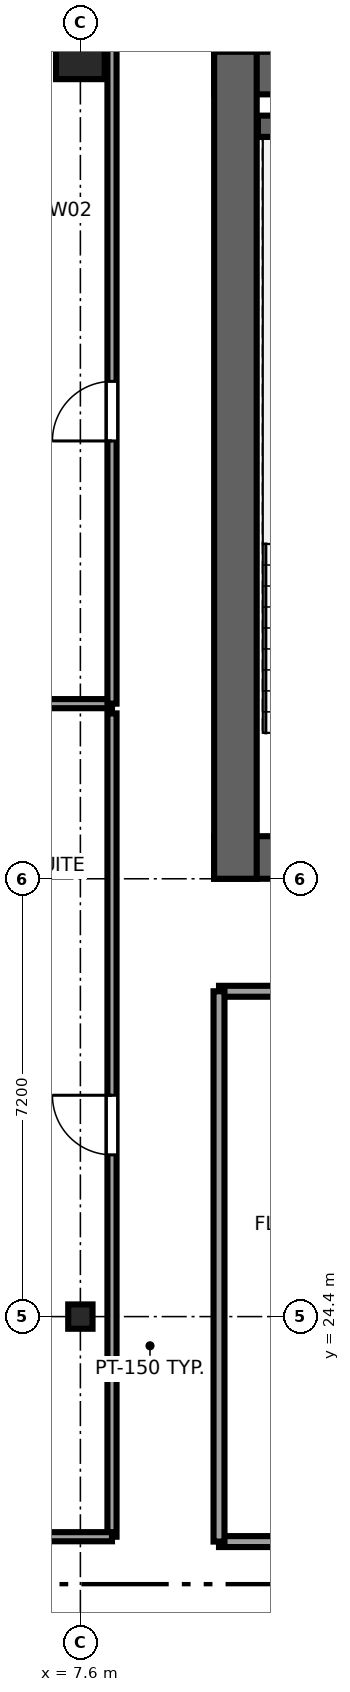
"""IFC4 building model, lengths in metres.
Left out: names, types, materials, properties, quantities, classifications, styles, units other than length and angle.
Written with IfcOpenShell. Run it as: python <this file> out.ifc"""

import sys

from ifc_helpers import new_model, si_unit, direction, frame, frame_2d, origin, origin_2d, place, context, subcontext, project, spatial, rectangle, i_section, extrude, source, transform, mapped, element, fill, save


model = new_model("IFC4")
c1 = context("Model", 3, precision=1e-05, world=origin(), true_north=direction((0.0, 1.0)))
c2 = subcontext(c1, "Body", "Model", "MODEL_VIEW")
j1 = project(units=[si_unit("LENGTHUNIT", "METRE"), si_unit("PLANEANGLEUNIT", "RADIAN")], contexts=[c1])
p1 = place(None, origin())
s1 = spatial("IfcSite", under=j1, at=p1, CompositionType="ELEMENT")
p2 = place(p1, origin())
s2 = spatial("IfcBuilding", under=s1, at=p2, CompositionType="ELEMENT")
p3 = place(p2, frame((0.0, 0.0, 175.45)))
s3 = spatial("IfcBuildingStorey", under=s2, at=p3, CompositionType="ELEMENT", Elevation=175.45)
p4 = place(p3, frame((9.8, 31.95, 0.0), z_axis=(0.0, 0.0, 1.0), x_axis=(1.0, 0.0, 0.0)))
e1 = element("IfcWall", 1, at=p4, inside=s3, PredefinedType="SHEAR", context=c2, shape_type="SweptSolid", body=[
    extrude(rectangle(XDim=26.4, YDim=0.7, at=frame_2d((13.2, 0.0))), origin(), (0.0, 0.0, 1.0), 3.55),
])
p5 = place(p4, frame((6.32, 0.0, 0.0), z_axis=(0.0, 0.0, 1.0), x_axis=(-1.0, 0.0, 0.0)))
e2 = element("IfcOpeningElement", 2, at=p5, cuts=e1, PredefinedType="OPENING", context=c2, shape_type="SweptSolid", body=[
    extrude(rectangle(XDim=1.5, YDim=2.04, at=frame_2d((0.75, 1.02))), frame((0.0, 0.36, 0.0), z_axis=(0.0, -1.0, 0.0), x_axis=(1.0, 0.0, 0.0)), (0.0, 0.0, 1.0), 0.72),
])
p6 = place(p4, frame((13.95, 0.0, 0.0), z_axis=(0.0, 0.0, 1.0), x_axis=(-1.0, 0.0, 0.0)))
e3 = element("IfcOpeningElement", 3, at=p6, cuts=e1, PredefinedType="OPENING", context=c2, shape_type="SweptSolid", body=[
    extrude(rectangle(XDim=1.5, YDim=2.04, at=frame_2d((0.75, 1.02))), frame((0.0, 0.36, 0.0), z_axis=(0.0, -1.0, 0.0), x_axis=(1.0, 0.0, 0.0)), (0.0, 0.0, 1.0), 0.72),
])
p7 = place(p4, frame((20.25, 0.0, 0.0), z_axis=(0.0, 0.0, 1.0), x_axis=(-1.0, 0.0, 0.0)))
e4 = element("IfcOpeningElement", 4, at=p7, cuts=e1, PredefinedType="OPENING", context=c2, shape_type="SweptSolid", body=[
    extrude(rectangle(XDim=1.5, YDim=2.04, at=frame_2d((0.75, 1.02))), frame((0.0, 0.36, 0.0), z_axis=(0.0, -1.0, 0.0), x_axis=(1.0, 0.0, 0.0)), (0.0, 0.0, 1.0), 0.72),
])
p8 = place(p4, frame((8.37, 0.0, 0.0), z_axis=(0.0, 0.0, 1.0), x_axis=(-1.0, 0.0, 0.0)))
e5 = element("IfcOpeningElement", 5, at=p8, cuts=e1, PredefinedType="OPENING", context=c2, shape_type="SweptSolid", body=[
    extrude(rectangle(XDim=0.82, YDim=2.01, at=frame_2d((0.41, 1.005))), frame((0.0, 0.36, 0.0), z_axis=(0.0, -1.0, 0.0), x_axis=(1.0, 0.0, 0.0)), (0.0, 0.0, 1.0), 0.72),
])
p9 = place(p3, frame((9.8, 44.85, 0.0), z_axis=(0.0, 0.0, 1.0), x_axis=(1.0, 0.0, 0.0)))
e6 = element("IfcWall", 6, at=p9, inside=s3, PredefinedType="SHEAR", context=c2, shape_type="SweptSolid", body=[
    extrude(rectangle(XDim=26.4, YDim=0.7, at=frame_2d((13.2, 0.0))), origin(), (0.0, 0.0, 1.0), 3.55),
])
p10 = place(p3, frame((10.15, 31.6, 0.0), z_axis=(0.0, 0.0, 1.0), x_axis=(0.0, 1.0, 0.0)))
e7 = element("IfcWall", 7, at=p10, inside=s3, PredefinedType="SHEAR", context=c2, shape_type="SweptSolid", body=[
    extrude(rectangle(XDim=13.6, YDim=0.7, at=frame_2d((6.8, 0.0))), origin(), (0.0, 0.0, 1.0), 3.55),
])
p11 = place(p3, frame((10.52, 43.975, 0.0), z_axis=(0.0, 0.0, 1.0), x_axis=(1.0, 0.0, 0.0)))
e8 = element("IfcWall", 8, at=p11, inside=s3, PredefinedType="SHEAR", context=c2, shape_type="SweptSolid", body=[
    extrude(rectangle(XDim=3.6, YDim=0.35, at=frame_2d((1.8, 0.0))), origin(), (0.0, 0.0, 1.0), 3.55),
])
m1 = source(origin(), c2, "Body", "SweptSolid", [
    extrude(i_section(OverallWidth=0.4, OverallDepth=0.4, WebThickness=0.02, FlangeThickness=0.035, at=origin_2d()), origin(), (0.0, 0.0, 1.0), 3.55),
])
p12 = place(p3, frame((7.6, 24.4, 0.0), z_axis=(0.0, 0.0, 1.0), x_axis=(1.0, 0.0, 0.0)))
e9 = element("IfcColumn", 9, at=p12, inside=s3, PredefinedType="COLUMN", context=c2, shape_type="MappedRepresentation", body=[
    mapped(m1, transform((0.0, 0.0, 0.0), x_axis=(1.0, 0.0, 0.0), y_axis=(0.0, 1.0, 0.0), z_axis=(0.0, 0.0, 1.0), scale=1.0)),
])
m2 = source(origin(), c2, "Body", "SweptSolid", [
    extrude(rectangle(XDim=0.8, YDim=0.8, at=origin_2d()), origin(), (0.0, 0.0, 1.0), 3.55),
])
p13 = place(p3, frame((7.6, 45.15, 0.0), z_axis=(0.0, 0.0, 1.0), x_axis=(1.0, 0.0, 0.0)))
e10 = element("IfcColumn", 10, at=p13, inside=s3, PredefinedType="COLUMN", context=c2, shape_type="MappedRepresentation", body=[
    mapped(m2, transform((0.0, 0.0, 0.0), x_axis=(1.0, 0.0, 0.0), y_axis=(0.0, 1.0, 0.0), z_axis=(0.0, 0.0, 1.0), scale=1.0)),
])
p14 = place(p3, frame((3.005, 34.48, 0.0), z_axis=(0.0, 0.0, 1.0), x_axis=(1.0, 0.0, 0.0)))
e11 = element("IfcWall", 11, at=p14, inside=s3, PredefinedType="PARTITIONING", context=c2, shape_type="SweptSolid", body=[
    extrude(rectangle(XDim=5.115, YDim=0.15, at=frame_2d((2.558, 0.0))), origin(), (0.0, 0.0, 1.0), 3.37),
])
p15 = place(p3, frame((8.12, 20.78, 0.0), z_axis=(0.0, 0.0, 1.0), x_axis=(0.0, 1.0, 0.0)))
e12 = element("IfcWall", 12, at=p15, inside=s3, PredefinedType="PARTITIONING", context=c2, shape_type="SweptSolid", body=[
    extrude(rectangle(XDim=13.54, YDim=0.15, at=frame_2d((6.77, 0.0))), origin(), (0.0, 0.0, 1.0), 3.37),
])
p16 = place(p15, frame((6.28, 0.0, 0.0)))
e13 = element("IfcOpeningElement", 13, at=p16, cuts=e12, PredefinedType="OPENING", context=c2, shape_type="SweptSolid", body=[
    extrude(rectangle(XDim=0.98, YDim=2.12, at=frame_2d((0.49, 1.06))), frame((0.0, 0.085, 0.0), z_axis=(0.0, -1.0, 0.0), x_axis=(1.0, 0.0, 0.0)), (0.0, 0.0, 1.0), 0.17),
])
p17 = place(p3, frame((5.07, 20.78, 0.0), z_axis=(0.0, 0.0, 1.0), x_axis=(1.0, 0.0, 0.0)))
e14 = element("IfcWall", 14, at=p17, inside=s3, PredefinedType="PARTITIONING", context=c2, shape_type="SweptSolid", body=[
    extrude(rectangle(XDim=3.05, YDim=0.15, at=frame_2d((1.525, 0.0))), origin(), (0.0, 0.0, 1.0), 3.37),
])
p18 = place(p3, frame((8.12, 34.48, 0.0), z_axis=(0.0, 0.0, 1.0), x_axis=(0.0, 1.0, 0.0)))
e15 = element("IfcWall", 15, at=p18, inside=s3, PredefinedType="PARTITIONING", context=c2, shape_type="SweptSolid", body=[
    extrude(rectangle(XDim=11.115, YDim=0.15, at=frame_2d((5.558, 0.0))), origin(), (0.0, 0.0, 1.0), 3.37),
])
p19 = place(p18, frame((4.32, 0.0, 0.0)))
e16 = element("IfcOpeningElement", 16, at=p19, cuts=e15, PredefinedType="OPENING", context=c2, shape_type="SweptSolid", body=[
    extrude(rectangle(XDim=0.98, YDim=2.12, at=frame_2d((0.49, 1.06))), frame((0.0, 0.085, 0.0), z_axis=(0.0, -1.0, 0.0), x_axis=(1.0, 0.0, 0.0)), (0.0, 0.0, 1.0), 0.17),
])
p20 = place(p3, frame((9.88, 20.7, 0.0), z_axis=(0.0, 0.0, 1.0), x_axis=(1.0, 0.0, 0.0)))
e17 = element("IfcWall", 17, at=p20, inside=s3, PredefinedType="PARTITIONING", context=c2, shape_type="SweptSolid", body=[
    extrude(rectangle(XDim=4.22, YDim=0.18, at=frame_2d((2.11, 0.0))), origin(), (0.0, 0.0, 1.0), 3.37),
])
p21 = place(p20, frame((1.285, 0.0, 0.0)))
e18 = element("IfcOpeningElement", 18, at=p21, cuts=e17, PredefinedType="OPENING", context=c2, shape_type="SweptSolid", body=[
    extrude(rectangle(XDim=1.65, YDim=2.15, at=frame_2d((0.825, 1.075))), frame((0.0, 0.1, 0.0), z_axis=(0.0, -1.0, 0.0), x_axis=(1.0, 0.0, 0.0)), (0.0, 0.0, 1.0), 0.2),
])
p22 = place(p3, frame((9.88, 29.75, 0.0), z_axis=(0.0, 0.0, 1.0), x_axis=(1.0, 0.0, 0.0)))
e19 = element("IfcWall", 19, at=p22, inside=s3, PredefinedType="PARTITIONING", context=c2, shape_type="SweptSolid", body=[
    extrude(rectangle(XDim=4.22, YDim=0.18, at=frame_2d((2.11, 0.0))), origin(), (0.0, 0.0, 1.0), 3.37),
])
p23 = place(p3, frame((9.88, 20.7, 0.0), z_axis=(0.0, 0.0, 1.0), x_axis=(0.0, 1.0, 0.0)))
e20 = element("IfcWall", 20, at=p23, inside=s3, PredefinedType="PARTITIONING", context=c2, shape_type="SweptSolid", body=[
    extrude(rectangle(XDim=9.05, YDim=0.18, at=frame_2d((4.525, 0.0))), origin(), (0.0, 0.0, 1.0), 3.37),
])
m3 = source(origin(), c2, "Body", "SweptSolid", [
    extrude(rectangle(XDim=0.98, YDim=2.12, at=frame_2d((0.49, 1.06))), frame((0.0, 0.025, 0.0), z_axis=(0.0, -1.0, 0.0), x_axis=(1.0, 0.0, 0.0)), (0.0, 0.0, 1.0), 0.05),
])
p24 = place(p16, origin())
e21 = element("IfcDoor", 21, at=p24, inside=s3, OperationType="SINGLE_SWING_RIGHT", PredefinedType="DOOR", context=c2, shape_type="MappedRepresentation", body=[
    mapped(m3, transform((0.0, 0.0, 0.0), x_axis=(1.0, 0.0, 0.0), y_axis=(0.0, 1.0, 0.0), z_axis=(0.0, 0.0, 1.0), scale=1.0)),
])
fill(e13, e21)
p25 = place(p19, origin())
e22 = element("IfcDoor", 22, at=p25, inside=s3, OperationType="SINGLE_SWING_LEFT", PredefinedType="DOOR", context=c2, shape_type="MappedRepresentation", body=[
    mapped(m3, transform((0.0, 0.0, 0.0), x_axis=(1.0, 0.0, 0.0), y_axis=(0.0, 1.0, 0.0), z_axis=(0.0, 0.0, 1.0), scale=1.0)),
])
fill(e16, e22)
save(model, sys.argv[1])
